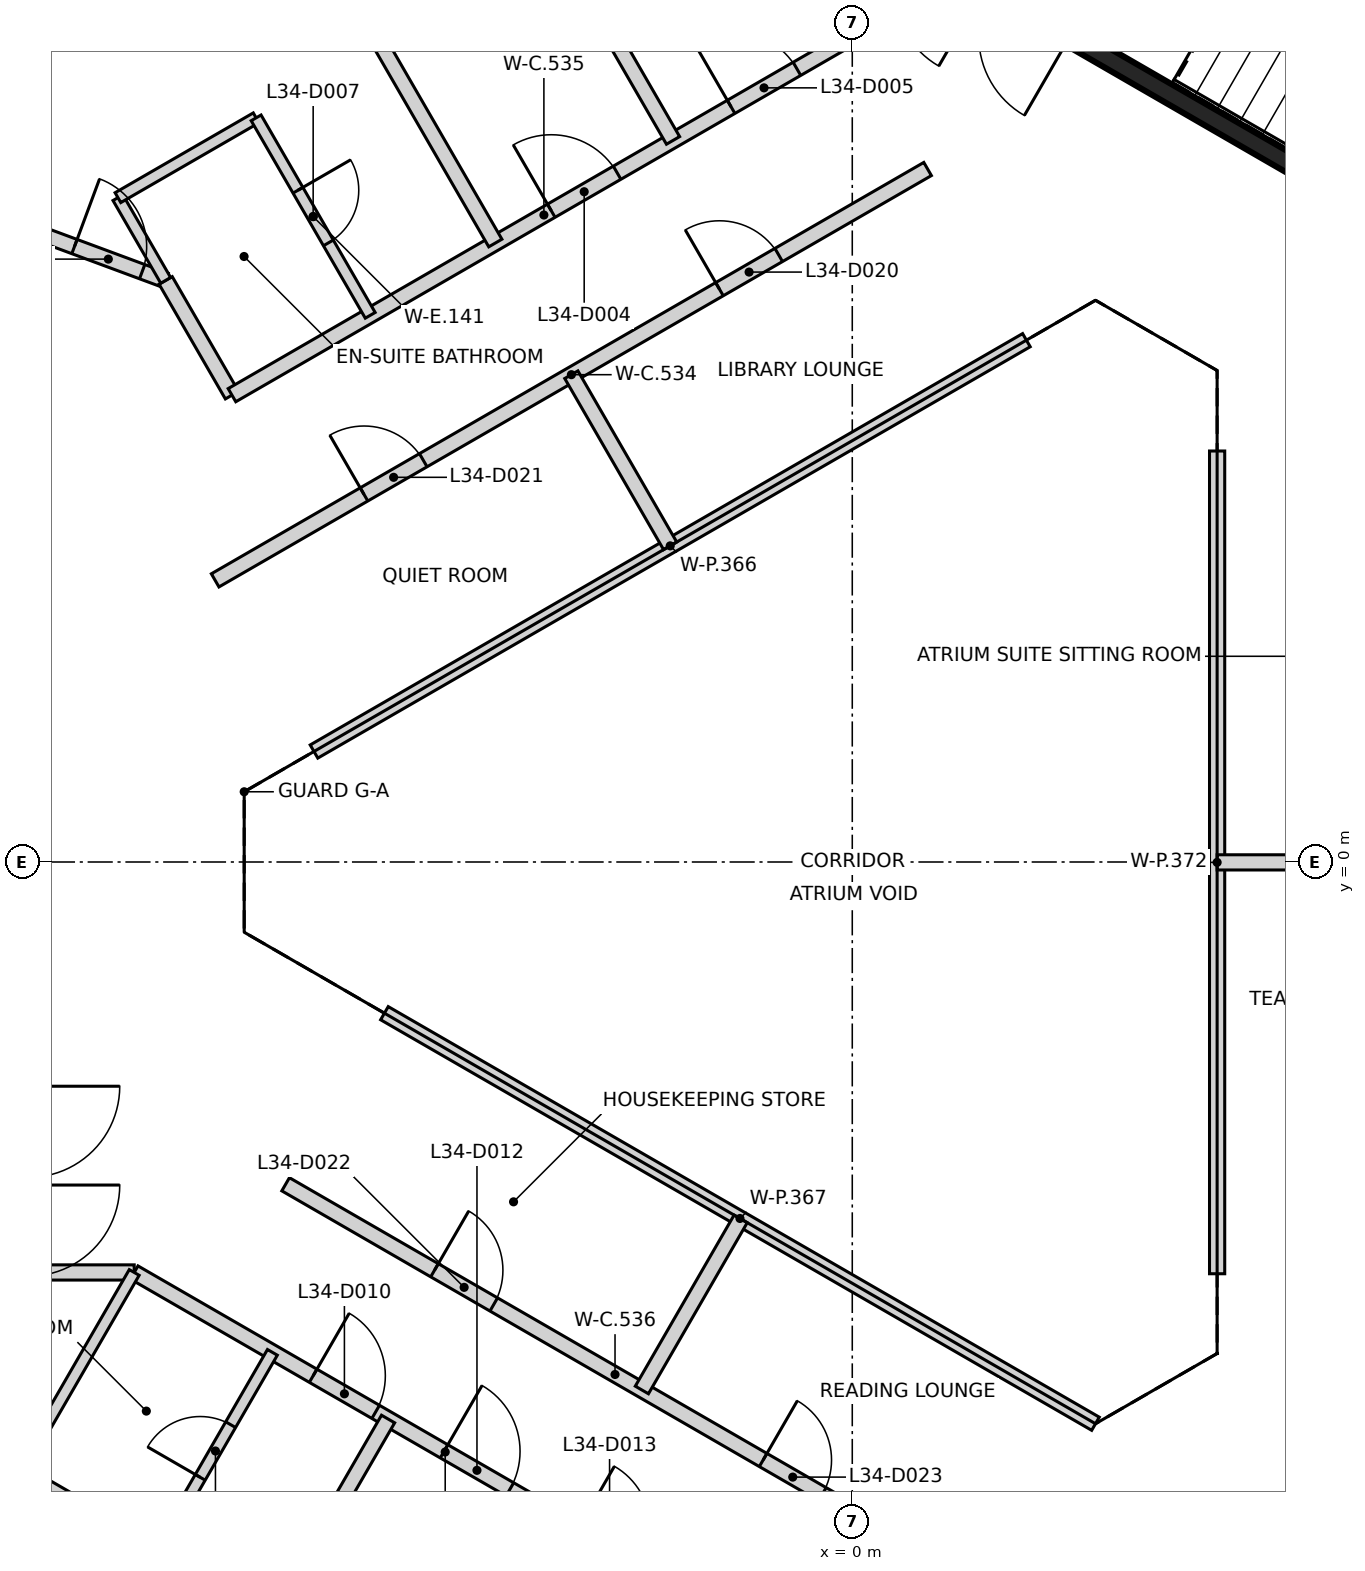
"""IFC4 building model, lengths in metres.
Left out: names, types, materials, properties, quantities, classifications, styles, units other than length and angle.
Written with IfcOpenShell. Run it as: python <this file> out.ifc"""

import sys

from ifc_helpers import new_model, si_unit, direction, frame, frame_2d, origin, place, context, subcontext, project, spatial, rectangle, extrude, element, fill, save


model = new_model("IFC4")
c1 = context("Model", 3, precision=1e-05, world=origin(), true_north=direction((0.0, 1.0)))
c2 = subcontext(c1, "Body", "Model", "MODEL_VIEW")
j1 = project(units=[si_unit("LENGTHUNIT", "METRE"), si_unit("PLANEANGLEUNIT", "RADIAN")], contexts=[c1])
p1 = place(None, origin())
s1 = spatial("IfcSite", under=j1, at=p1, CompositionType="ELEMENT")
p2 = place(p1, origin())
s2 = spatial("IfcBuilding", under=s1, at=p2, CompositionType="ELEMENT")
p3 = place(p2, frame((0.0, 0.0, 139.6)))
s3 = spatial("IfcBuildingStorey", under=s2, at=p3, CompositionType="ELEMENT", Elevation=139.6)
p4 = place(p3, frame((10.42, 6.498, 0.0), z_axis=(0.0, 0.0, 1.0), x_axis=(-0.866021906294, 0.500006057782, 0.0)))
e1 = element("IfcWall", 1, at=p4, inside=s3, PredefinedType="SHEAR", context=c2, shape_type="SweptSolid", body=[
    extrude(rectangle(XDim=11.55, YDim=0.25, at=frame_2d((5.775, 0.0))), origin(), (0.0, 0.0, 1.0), 3.2),
])
p5 = place(p4, frame((10.025, 0.0, 0.0)))
e2 = element("IfcOpeningElement", 2, at=p5, cuts=e1, PredefinedType="OPENING", context=c2, shape_type="SweptSolid", body=[
    extrude(rectangle(XDim=1.2, YDim=2.1, at=frame_2d((0.6, 1.05))), frame((0.0, 0.135, 0.0), z_axis=(0.0, -1.0, 0.0), x_axis=(1.0, 0.0, 0.0)), (0.0, 0.0, 1.0), 0.27),
])
p6 = place(p4, frame((8.725, 0.0, 0.0)))
e3 = element("IfcOpeningElement", 3, at=p6, cuts=e1, PredefinedType="OPENING", context=c2, shape_type="SweptSolid", body=[
    extrude(rectangle(XDim=1.2, YDim=2.1, at=frame_2d((0.6, 1.05))), frame((0.0, 0.135, 0.0), z_axis=(0.0, -1.0, 0.0), x_axis=(1.0, 0.0, 0.0)), (0.0, 0.0, 1.0), 0.27),
])
p7 = place(p3, frame((0.417, -12.273, 0.0), z_axis=(0.0, 0.0, 1.0), x_axis=(0.866021906294, 0.500006057782, 0.0)))
e4 = element("IfcWall", 4, at=p7, inside=s3, PredefinedType="SHEAR", context=c2, shape_type="SweptSolid", body=[
    extrude(rectangle(XDim=11.55, YDim=0.25, at=frame_2d((5.775, 0.0))), origin(), (0.0, 0.0, 1.0), 3.2),
])
p8 = place(p7, frame((10.025, 0.0, 0.0)))
e5 = element("IfcOpeningElement", 5, at=p8, cuts=e4, PredefinedType="OPENING", context=c2, shape_type="SweptSolid", body=[
    extrude(rectangle(XDim=1.2, YDim=2.1, at=frame_2d((0.6, 1.05))), frame((0.0, 0.135, 0.0), z_axis=(0.0, -1.0, 0.0), x_axis=(1.0, 0.0, 0.0)), (0.0, 0.0, 1.0), 0.27),
])
p9 = place(p7, frame((8.725, 0.0, 0.0)))
e6 = element("IfcOpeningElement", 6, at=p9, cuts=e4, PredefinedType="OPENING", context=c2, shape_type="SweptSolid", body=[
    extrude(rectangle(XDim=1.2, YDim=2.1, at=frame_2d((0.6, 1.05))), frame((0.0, 0.135, 0.0), z_axis=(0.0, -1.0, 0.0), x_axis=(1.0, 0.0, 0.0)), (0.0, 0.0, 1.0), 0.27),
])
p10 = place(p3, frame((-16.026, 10.245, 0.0), z_axis=(0.0, 0.0, 1.0), x_axis=(0.937607706988, -0.347694963721, 0.0)))
e7 = element("IfcWall", 7, at=p10, inside=s3, PredefinedType="PARTITIONING", context=c2, shape_type="SweptSolid", body=[
    extrude(rectangle(XDim=7.458, YDim=0.2, at=frame_2d((3.729, 0.0))), origin(), (0.0, 0.0, 1.0), 3.2),
])
p11 = place(p10, frame((6.179, 0.0, 0.0)))
e8 = element("IfcOpeningElement", 8, at=p11, cuts=e7, PredefinedType="OPENING", context=c2, shape_type="SweptSolid", body=[
    extrude(rectangle(XDim=0.95, YDim=2.1, at=frame_2d((0.475, 1.05))), frame((0.0, 0.11, 0.0), z_axis=(0.0, -1.0, 0.0), x_axis=(1.0, 0.0, 0.0)), (0.0, 0.0, 1.0), 0.22),
])
p12 = place(p10, frame((2.139, 0.0, 0.0)))
e9 = element("IfcOpeningElement", 9, at=p12, cuts=e7, PredefinedType="OPENING", context=c2, shape_type="SweptSolid", body=[
    extrude(rectangle(XDim=1.0, YDim=2.1, at=frame_2d((0.5, 1.05))), frame((0.0, 0.11, 0.0), z_axis=(0.0, -1.0, 0.0), x_axis=(1.0, 0.0, 0.0)), (0.0, 0.0, 1.0), 0.22),
])
p13 = place(p3, frame((-10.652, -5.4, 0.0), z_axis=(0.0, 0.0, 1.0), x_axis=(1.0, 0.0, 0.0)))
e10 = element("IfcWall", 10, at=p13, inside=s3, PredefinedType="PARTITIONING", context=c2, shape_type="SweptSolid", body=[
    extrude(rectangle(XDim=1.205, YDim=0.2, at=frame_2d((0.603, 0.0))), origin(), (0.0, 0.0, 1.0), 3.2),
])
p14 = place(p3, frame((-9.447, -5.4, 0.0), z_axis=(0.0, 0.0, 1.0), x_axis=(0.866101262146, -0.49986858644, 0.0)))
e11 = element("IfcWall", 11, at=p14, inside=s3, PredefinedType="PARTITIONING", context=c2, shape_type="SweptSolid", body=[
    extrude(rectangle(XDim=9.449, YDim=0.2, at=frame_2d((4.724, 0.0))), origin(), (0.0, 0.0, 1.0), 3.2),
])
p15 = place(p14, frame((2.718, 0.0, 0.0)))
e12 = element("IfcOpeningElement", 12, at=p15, cuts=e11, PredefinedType="OPENING", context=c2, shape_type="SweptSolid", body=[
    extrude(rectangle(XDim=0.95, YDim=2.1, at=frame_2d((0.475, 1.05))), frame((0.0, 0.11, 0.0), z_axis=(0.0, -1.0, 0.0), x_axis=(1.0, 0.0, 0.0)), (0.0, 0.0, 1.0), 0.22),
])
p16 = place(p14, frame((4.707, 0.0, 0.0)))
e13 = element("IfcOpeningElement", 13, at=p16, cuts=e11, PredefinedType="OPENING", context=c2, shape_type="SweptSolid", body=[
    extrude(rectangle(XDim=1.0, YDim=2.1, at=frame_2d((0.5, 1.05))), frame((0.0, 0.11, 0.0), z_axis=(0.0, -1.0, 0.0), x_axis=(1.0, 0.0, 0.0)), (0.0, 0.0, 1.0), 0.22),
])
p17 = place(p14, frame((6.746, 0.0, 0.0)))
e14 = element("IfcOpeningElement", 14, at=p17, cuts=e11, PredefinedType="OPENING", context=c2, shape_type="SweptSolid", body=[
    extrude(rectangle(XDim=0.95, YDim=2.1, at=frame_2d((0.475, 1.05))), frame((0.0, 0.11, 0.0), z_axis=(0.0, -1.0, 0.0), x_axis=(1.0, 0.0, 0.0)), (0.0, 0.0, 1.0), 0.22),
])
p18 = place(p3, frame((-9.033, 7.651, 0.0), z_axis=(0.0, 0.0, 1.0), x_axis=(0.500417633986, -0.865784148386, 0.0)))
e15 = element("IfcWall", 15, at=p18, inside=s3, PredefinedType="PARTITIONING", context=c2, shape_type="SweptSolid", body=[
    extrude(rectangle(XDim=1.743, YDim=0.2, at=frame_2d((0.871, 0.0))), origin(), (0.0, 0.0, 1.0), 3.2),
])
p19 = place(p3, frame((-8.382, 3.705, 0.0), z_axis=(0.0, 0.0, 1.0), x_axis=(0.866012036978, 0.500023151273, 0.0)))
e16 = element("IfcWall", 16, at=p19, inside=s3, PredefinedType="PARTITIONING", context=c2, shape_type="SweptSolid", body=[
    extrude(rectangle(XDim=10.823, YDim=0.2, at=frame_2d((5.412, 0.0))), origin(), (0.0, 0.0, 1.0), 3.2),
])
p20 = place(p19, frame((7.661, 0.0, 0.0)))
e17 = element("IfcOpeningElement", 17, at=p20, cuts=e16, PredefinedType="OPENING", context=c2, shape_type="SweptSolid", body=[
    extrude(rectangle(XDim=0.9, YDim=2.1, at=frame_2d((0.45, 1.05))), frame((0.0, 0.11, 0.0), z_axis=(0.0, -1.0, 0.0), x_axis=(1.0, 0.0, 0.0)), (0.0, 0.0, 1.0), 0.22),
])
p21 = place(p19, frame((2.261, 0.0, 0.0)))
e18 = element("IfcOpeningElement", 18, at=p21, cuts=e16, PredefinedType="OPENING", context=c2, shape_type="SweptSolid", body=[
    extrude(rectangle(XDim=0.9, YDim=2.1, at=frame_2d((0.45, 1.05))), frame((0.0, 0.11, 0.0), z_axis=(0.0, -1.0, 0.0), x_axis=(1.0, 0.0, 0.0)), (0.0, 0.0, 1.0), 0.22),
])
p22 = place(p3, frame((-8.161, 6.142, 0.0), z_axis=(0.0, 0.0, 1.0), x_axis=(0.865927304867, 0.500169873828, 0.0)))
e19 = element("IfcWall", 19, at=p22, inside=s3, PredefinedType="PARTITIONING", context=c2, shape_type="SweptSolid", body=[
    extrude(rectangle(XDim=9.478, YDim=0.2, at=frame_2d((4.739, 0.0))), origin(), (0.0, 0.0, 1.0), 3.2),
])
p23 = place(p22, frame((4.851, 0.0, 0.0)))
e20 = element("IfcOpeningElement", 20, at=p23, cuts=e19, PredefinedType="OPENING", context=c2, shape_type="SweptSolid", body=[
    extrude(rectangle(XDim=1.0, YDim=2.1, at=frame_2d((0.5, 1.05))), frame((0.0, 0.11, 0.0), z_axis=(0.0, -1.0, 0.0), x_axis=(1.0, 0.0, 0.0)), (0.0, 0.0, 1.0), 0.22),
])
p24 = place(p22, frame((7.583, 0.0, 0.0)))
e21 = element("IfcOpeningElement", 21, at=p24, cuts=e19, PredefinedType="OPENING", context=c2, shape_type="SweptSolid", body=[
    extrude(rectangle(XDim=1.0, YDim=2.1, at=frame_2d((0.5, 1.05))), frame((0.0, 0.11, 0.0), z_axis=(0.0, -1.0, 0.0), x_axis=(1.0, 0.0, 0.0)), (0.0, 0.0, 1.0), 0.22),
])
p25 = place(p3, frame((-7.455, -4.24, 0.0), z_axis=(0.0, 0.0, 1.0), x_axis=(0.866015783746, -0.500016662025, 0.0)))
e22 = element("IfcWall", 22, at=p25, inside=s3, PredefinedType="PARTITIONING", context=c2, shape_type="SweptSolid", body=[
    extrude(rectangle(XDim=10.009, YDim=0.2, at=frame_2d((5.004, 0.0))), origin(), (0.0, 0.0, 1.0), 3.2),
])
p26 = place(p25, frame((2.262, 0.0, 0.0)))
e23 = element("IfcOpeningElement", 23, at=p26, cuts=e22, PredefinedType="OPENING", context=c2, shape_type="SweptSolid", body=[
    extrude(rectangle(XDim=0.9, YDim=2.1, at=frame_2d((0.45, 1.05))), frame((0.0, 0.11, 0.0), z_axis=(0.0, -1.0, 0.0), x_axis=(1.0, 0.0, 0.0)), (0.0, 0.0, 1.0), 0.22),
])
p27 = place(p25, frame((7.254, 0.0, 0.0)))
e24 = element("IfcOpeningElement", 24, at=p27, cuts=e22, PredefinedType="OPENING", context=c2, shape_type="SweptSolid", body=[
    extrude(rectangle(XDim=0.9, YDim=2.1, at=frame_2d((0.45, 1.05))), frame((0.0, 0.11, 0.0), z_axis=(0.0, -1.0, 0.0), x_axis=(1.0, 0.0, 0.0)), (0.0, 0.0, 1.0), 0.22),
])
p28 = place(p3, frame((-12.22, -17.917, 0.0), z_axis=(0.0, 0.0, 1.0), x_axis=(0.499963860175, 0.866046268117, 0.0)))
e25 = element("IfcWall", 25, at=p28, inside=s3, PredefinedType="PARTITIONING", context=c2, shape_type="SweptSolid", body=[
    extrude(rectangle(XDim=12.227, YDim=0.2, at=frame_2d((6.114, 0.0))), origin(), (0.0, 0.0, 1.0), 2.3),
])
p29 = place(p3, frame((-10.809, 18.731, 0.0), z_axis=(0.0, 0.0, 1.0), x_axis=(0.500004774777, -0.866022647048, 0.0)))
e26 = element("IfcWall", 26, at=p29, inside=s3, PredefinedType="PARTITIONING", context=c2, shape_type="SweptSolid", body=[
    extrude(rectangle(XDim=12.227, YDim=0.2, at=frame_2d((6.113, 0.0))), origin(), (0.0, 0.0, 1.0), 2.3),
])
p30 = place(p3, frame((-8.468, 20.076, 0.0), z_axis=(0.0, 0.0, 1.0), x_axis=(0.499961688474, -0.866047521824, 0.0)))
e27 = element("IfcWall", 27, at=p30, inside=s3, PredefinedType="PARTITIONING", context=c2, shape_type="SweptSolid", body=[
    extrude(rectangle(XDim=12.22, YDim=0.2, at=frame_2d((6.11, 0.0))), origin(), (0.0, 0.0, 1.0), 2.3),
])
p31 = place(p3, frame((-7.082, 1.453, 0.0), z_axis=(0.0, 0.0, 1.0), x_axis=(0.866010525116, 0.500025769724, 0.0)))
e28 = element("IfcWall", 28, at=p31, inside=s3, PredefinedType="PARTITIONING", context=c2, shape_type="SweptSolid", body=[
    extrude(rectangle(XDim=10.823, YDim=0.2, at=frame_2d((5.411, 0.0))), origin(), (0.0, 0.0, 1.0), 2.3),
])
p32 = place(p3, frame((-6.155, -1.989, 0.0), z_axis=(0.0, 0.0, 1.0), x_axis=(0.866009062299, -0.500028303215, 0.0)))
e29 = element("IfcWall", 29, at=p32, inside=s3, PredefinedType="PARTITIONING", context=c2, shape_type="SweptSolid", body=[
    extrude(rectangle(XDim=10.802, YDim=0.2, at=frame_2d((5.401, 0.0))), origin(), (0.0, 0.0, 1.0), 2.3),
])
p33 = place(p3, frame((-3.696, 6.411, 0.0), z_axis=(0.0, 0.0, 1.0), x_axis=(0.500006934395, -0.866021400173, 0.0)))
e30 = element("IfcWall", 30, at=p33, inside=s3, PredefinedType="PARTITIONING", context=c2, shape_type="SweptSolid", body=[
    extrude(rectangle(XDim=2.6, YDim=0.2, at=frame_2d((1.3, 0.0))), origin(), (0.0, 0.0, 1.0), 2.3),
])
p34 = place(p3, frame((-2.768, -6.946, 0.0), z_axis=(0.0, 0.0, 1.0), x_axis=(0.500017832597, 0.866015107885, 0.0)))
e31 = element("IfcWall", 31, at=p34, inside=s3, PredefinedType="PARTITIONING", context=c2, shape_type="SweptSolid", body=[
    extrude(rectangle(XDim=2.6, YDim=0.2, at=frame_2d((1.3, 0.0))), origin(), (0.0, 0.0, 1.0), 2.3),
])
p35 = place(p3, frame((4.8, -5.417, 0.0), z_axis=(0.0, 0.0, 1.0), x_axis=(0.0, 1.0, 0.0)))
e32 = element("IfcWall", 32, at=p35, inside=s3, PredefinedType="PARTITIONING", context=c2, shape_type="SweptSolid", body=[
    extrude(rectangle(XDim=10.824, YDim=0.2, at=frame_2d((5.412, 0.0))), origin(), (0.0, 0.0, 1.0), 2.3),
])
p36 = place(p3, frame((4.8, -0.005, 0.0), z_axis=(0.0, 0.0, 1.0), x_axis=(1.0, 0.0, 0.0)))
e33 = element("IfcWall", 33, at=p36, inside=s3, PredefinedType="PARTITIONING", context=c2, shape_type="SweptSolid", body=[
    extrude(rectangle(XDim=2.505, YDim=0.2, at=frame_2d((1.252, 0.0))), origin(), (0.0, 0.0, 1.0), 2.3),
])
p37 = place(p3, frame((-10.946, -7.996, 0.0), z_axis=(0.0, 0.0, 1.0), x_axis=(0.500027927039, 0.866009279501, 0.0)))
e34 = element("IfcWall", 34, at=p37, inside=s3, PredefinedType="PARTITIONING", context=c2, shape_type="SweptSolid", body=[
    extrude(rectangle(XDim=2.998, YDim=0.15, at=frame_2d((1.499, 0.0))), origin(), (0.0, 0.0, 1.0), 3.2),
])
p38 = place(p3, frame((-10.945, -7.999, 0.0), z_axis=(0.0, 0.0, 1.0), x_axis=(0.866005190944, -0.500035008033, 0.0)))
e35 = element("IfcWall", 35, at=p38, inside=s3, PredefinedType="PARTITIONING", context=c2, shape_type="SweptSolid", body=[
    extrude(rectangle(XDim=2.096, YDim=0.15, at=frame_2d((1.048, 0.0))), origin(), (0.0, 0.0, 1.0), 3.2),
])
p39 = place(p3, frame((-9.661, 8.74, 0.0), z_axis=(0.0, 0.0, 1.0), x_axis=(0.49990192124, -0.866082022179, 0.0)))
e36 = element("IfcWall", 36, at=p39, inside=s3, PredefinedType="PARTITIONING", context=c2, shape_type="SweptSolid", body=[
    extrude(rectangle(XDim=1.256, YDim=0.15, at=frame_2d((0.628, 0.0))), origin(), (0.0, 0.0, 1.0), 3.2),
])
p40 = place(p3, frame((-9.661, 8.74, 0.0), z_axis=(0.0, 0.0, 1.0), x_axis=(0.865922159541, 0.500178781653, 0.0)))
e37 = element("IfcWall", 37, at=p40, inside=s3, PredefinedType="PARTITIONING", context=c2, shape_type="SweptSolid", body=[
    extrude(rectangle(XDim=2.099, YDim=0.15, at=frame_2d((1.05, 0.0))), origin(), (0.0, 0.0, 1.0), 3.2),
])
p41 = place(p3, frame((-9.127, -9.046, 0.0), z_axis=(0.0, 0.0, 1.0), x_axis=(0.499959910729, 0.866048548099, 0.0)))
e38 = element("IfcWall", 38, at=p41, inside=s3, PredefinedType="PARTITIONING", context=c2, shape_type="SweptSolid", body=[
    extrude(rectangle(XDim=2.996, YDim=0.15, at=frame_2d((1.498, 0.0))), origin(), (0.0, 0.0, 1.0), 3.2),
])
p42 = place(p41, frame((1.098, 0.0, 0.0)))
e39 = element("IfcOpeningElement", 39, at=p42, cuts=e38, PredefinedType="OPENING", context=c2, shape_type="SweptSolid", body=[
    extrude(rectangle(XDim=0.8, YDim=2.1, at=frame_2d((0.4, 1.05))), frame((0.0, 0.085, 0.0), z_axis=(0.0, -1.0, 0.0), x_axis=(1.0, 0.0, 0.0)), (0.0, 0.0, 1.0), 0.17),
])
p43 = place(p3, frame((-7.843, 9.79, 0.0), z_axis=(0.0, 0.0, 1.0), x_axis=(0.500234218456, -0.865890135459, 0.0)))
e40 = element("IfcWall", 40, at=p43, inside=s3, PredefinedType="PARTITIONING", context=c2, shape_type="SweptSolid", body=[
    extrude(rectangle(XDim=3.0, YDim=0.15, at=frame_2d((1.5, 0.0))), origin(), (0.0, 0.0, 1.0), 3.2),
])
p44 = place(p43, frame((1.1, 0.0, 0.0)))
e41 = element("IfcOpeningElement", 41, at=p44, cuts=e40, PredefinedType="OPENING", context=c2, shape_type="SweptSolid", body=[
    extrude(rectangle(XDim=0.8, YDim=2.1, at=frame_2d((0.4, 1.05))), frame((0.0, 0.085, 0.0), z_axis=(0.0, -1.0, 0.0), x_axis=(1.0, 0.0, 0.0)), (0.0, 0.0, 1.0), 0.17),
])
p45 = place(p23, origin())
e42 = element("IfcDoor", 42, at=p45, inside=s3, OperationType="SINGLE_SWING_LEFT", PredefinedType="DOOR", context=c2, shape_type="SweptSolid", body=[
    extrude(rectangle(XDim=1.0, YDim=2.1, at=frame_2d((0.5, 1.05))), frame((0.0, 0.025, 0.0), z_axis=(0.0, -1.0, 0.0), x_axis=(1.0, 0.0, 0.0)), (0.0, 0.0, 1.0), 0.05),
])
fill(e20, e42)
p46 = place(p24, origin())
e43 = element("IfcDoor", 43, at=p46, inside=s3, OperationType="SINGLE_SWING_LEFT", PredefinedType="DOOR", context=c2, shape_type="SweptSolid", body=[
    extrude(rectangle(XDim=1.0, YDim=2.1, at=frame_2d((0.5, 1.05))), frame((0.0, 0.025, 0.0), z_axis=(0.0, -1.0, 0.0), x_axis=(1.0, 0.0, 0.0)), (0.0, 0.0, 1.0), 0.05),
])
fill(e21, e43)
p47 = place(p11, origin())
e44 = element("IfcDoor", 44, at=p47, inside=s3, OperationType="SINGLE_SWING_LEFT", PredefinedType="DOOR", context=c2, shape_type="SweptSolid", body=[
    extrude(rectangle(XDim=0.95, YDim=2.1, at=frame_2d((0.475, 1.05))), frame((0.0, 0.025, 0.0), z_axis=(0.0, -1.0, 0.0), x_axis=(1.0, 0.0, 0.0)), (0.0, 0.0, 1.0), 0.05),
])
fill(e8, e44)
p48 = place(p44, frame((0.8, 0.0, 0.0), z_axis=(0.0, 0.0, 1.0), x_axis=(-1.0, 0.0, 0.0)))
e45 = element("IfcDoor", 45, at=p48, inside=s3, OperationType="SINGLE_SWING_LEFT", PredefinedType="DOOR", context=c2, shape_type="SweptSolid", body=[
    extrude(rectangle(XDim=0.8, YDim=2.1, at=frame_2d((0.4, 1.05))), frame((0.0, 0.025, 0.0), z_axis=(0.0, -1.0, 0.0), x_axis=(1.0, 0.0, 0.0)), (0.0, 0.0, 1.0), 0.05),
])
fill(e41, e45)
p49 = place(p15, frame((0.95, 0.0, 0.0), z_axis=(0.0, 0.0, 1.0), x_axis=(-1.0, 0.0, 0.0)))
e46 = element("IfcDoor", 46, at=p49, inside=s3, OperationType="SINGLE_SWING_LEFT", PredefinedType="DOOR", context=c2, shape_type="SweptSolid", body=[
    extrude(rectangle(XDim=0.95, YDim=2.1, at=frame_2d((0.475, 1.05))), frame((0.0, 0.025, 0.0), z_axis=(0.0, -1.0, 0.0), x_axis=(1.0, 0.0, 0.0)), (0.0, 0.0, 1.0), 0.05),
])
fill(e12, e46)
p50 = place(p42, origin())
e47 = element("IfcDoor", 47, at=p50, inside=s3, OperationType="SINGLE_SWING_LEFT", PredefinedType="DOOR", context=c2, shape_type="SweptSolid", body=[
    extrude(rectangle(XDim=0.8, YDim=2.1, at=frame_2d((0.4, 1.05))), frame((0.0, 0.025, 0.0), z_axis=(0.0, -1.0, 0.0), x_axis=(1.0, 0.0, 0.0)), (0.0, 0.0, 1.0), 0.05),
])
fill(e39, e47)
p51 = place(p16, frame((1.0, 0.0, 0.0), z_axis=(0.0, 0.0, 1.0), x_axis=(-1.0, 0.0, 0.0)))
e48 = element("IfcDoor", 48, at=p51, inside=s3, OperationType="SINGLE_SWING_LEFT", PredefinedType="DOOR", context=c2, shape_type="SweptSolid", body=[
    extrude(rectangle(XDim=1.0, YDim=2.1, at=frame_2d((0.5, 1.05))), frame((0.0, 0.025, 0.0), z_axis=(0.0, -1.0, 0.0), x_axis=(1.0, 0.0, 0.0)), (0.0, 0.0, 1.0), 0.05),
])
fill(e13, e48)
p52 = place(p20, frame((0.9, 0.0, 0.0), z_axis=(0.0, 0.0, 1.0), x_axis=(-1.0, 0.0, 0.0)))
e49 = element("IfcDoor", 49, at=p52, inside=s3, OperationType="SINGLE_SWING_LEFT", PredefinedType="DOOR", context=c2, shape_type="SweptSolid", body=[
    extrude(rectangle(XDim=0.9, YDim=2.1, at=frame_2d((0.45, 1.05))), frame((0.0, 0.025, 0.0), z_axis=(0.0, -1.0, 0.0), x_axis=(1.0, 0.0, 0.0)), (0.0, 0.0, 1.0), 0.05),
])
fill(e17, e49)
p53 = place(p21, frame((0.9, 0.0, 0.0), z_axis=(0.0, 0.0, 1.0), x_axis=(-1.0, 0.0, 0.0)))
e50 = element("IfcDoor", 50, at=p53, inside=s3, OperationType="SINGLE_SWING_LEFT", PredefinedType="DOOR", context=c2, shape_type="SweptSolid", body=[
    extrude(rectangle(XDim=0.9, YDim=2.1, at=frame_2d((0.45, 1.05))), frame((0.0, 0.025, 0.0), z_axis=(0.0, -1.0, 0.0), x_axis=(1.0, 0.0, 0.0)), (0.0, 0.0, 1.0), 0.05),
])
fill(e18, e50)
p54 = place(p26, origin())
e51 = element("IfcDoor", 51, at=p54, inside=s3, OperationType="SINGLE_SWING_LEFT", PredefinedType="DOOR", context=c2, shape_type="SweptSolid", body=[
    extrude(rectangle(XDim=0.9, YDim=2.1, at=frame_2d((0.45, 1.05))), frame((0.0, 0.025, 0.0), z_axis=(0.0, -1.0, 0.0), x_axis=(1.0, 0.0, 0.0)), (0.0, 0.0, 1.0), 0.05),
])
fill(e23, e51)
p55 = place(p27, origin())
e52 = element("IfcDoor", 52, at=p55, inside=s3, OperationType="SINGLE_SWING_LEFT", PredefinedType="DOOR", context=c2, shape_type="SweptSolid", body=[
    extrude(rectangle(XDim=0.9, YDim=2.1, at=frame_2d((0.45, 1.05))), frame((0.0, 0.025, 0.0), z_axis=(0.0, -1.0, 0.0), x_axis=(1.0, 0.0, 0.0)), (0.0, 0.0, 1.0), 0.05),
])
fill(e24, e52)
save(model, sys.argv[1])
